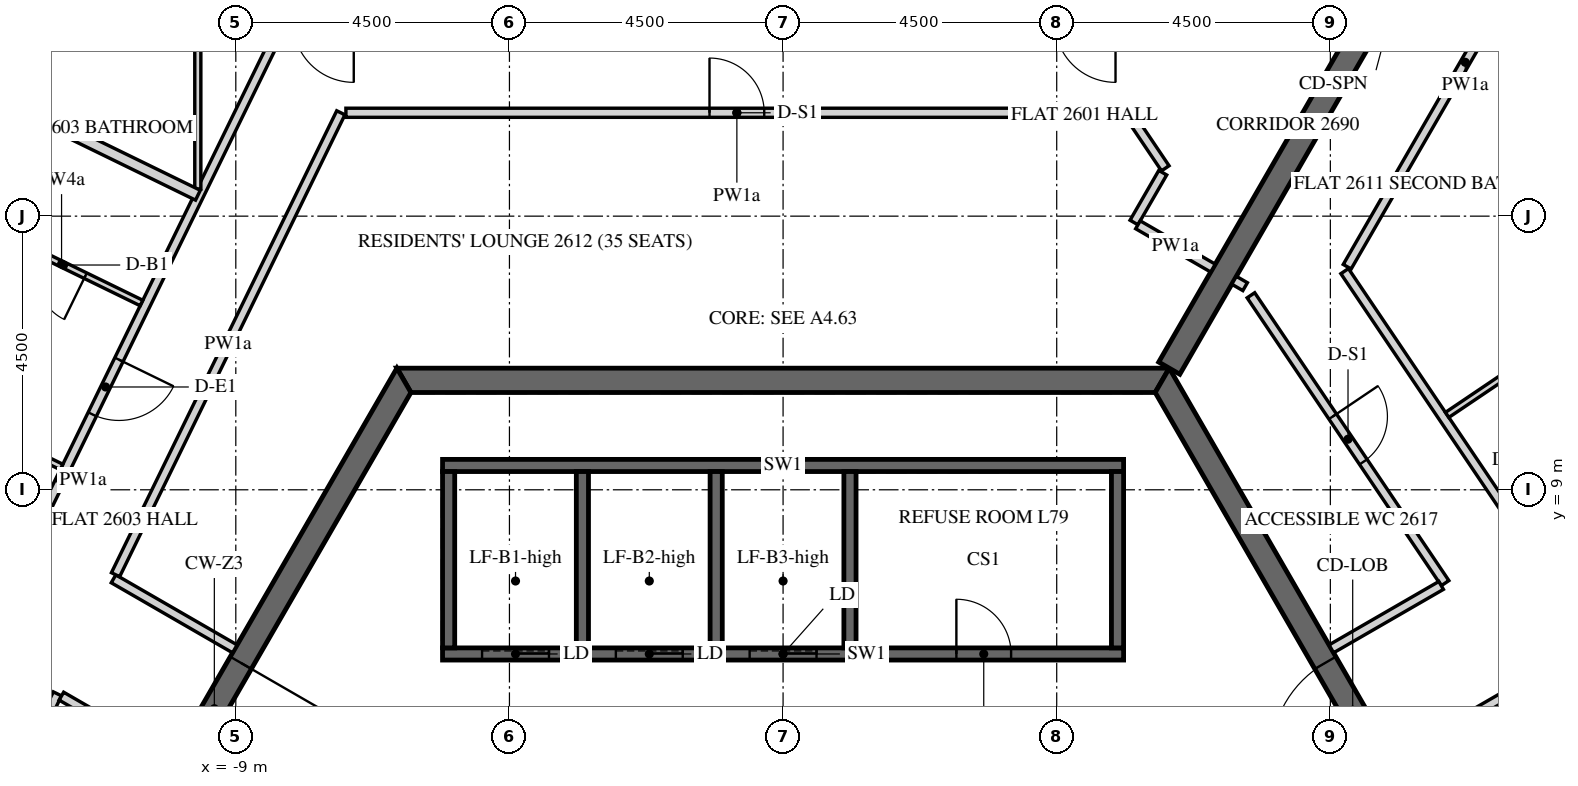
"""IFC4 building model, lengths in metres.
Left out: names, types, materials, properties, quantities, classifications, styles, units other than length and angle.
Written with IfcOpenShell. Run it as: python <this file> out.ifc"""

import sys

from ifc_helpers import new_model, si_unit, direction, frame, frame_2d, origin, place, context, subcontext, project, spatial, polyline, rectangle, outline, extrude, element, fill, save


model = new_model("IFC4")
c1 = context("Model", 3, precision=1e-05, world=origin(), true_north=direction((0.0, 1.0)))
c2 = subcontext(c1, "Body", "Model", "MODEL_VIEW")
j1 = project(units=[si_unit("LENGTHUNIT", "METRE"), si_unit("PLANEANGLEUNIT", "RADIAN")], contexts=[c1])
p1 = place(None, origin())
s1 = spatial("IfcSite", under=j1, at=p1, CompositionType="ELEMENT")
p2 = place(p1, origin())
s2 = spatial("IfcBuilding", under=s1, at=p2, CompositionType="ELEMENT")
p3 = place(p2, frame((0.0, 0.0, 326.4)))
s3 = spatial("IfcBuildingStorey", under=s2, at=p3, CompositionType="ELEMENT", Elevation=326.4)
p4 = place(p3, frame((-6.235, 10.8, -0.15), z_axis=(0.0, 0.0, 1.0), x_axis=(-0.499996419489, -0.866027470984, 0.0)))
e1 = element("IfcWall", 1, at=p4, inside=s3, PredefinedType="SHEAR", context=c2, shape_type="SweptSolid", body=[
    extrude(outline(polyline([(-0.115, -0.2), (12.586, -0.2), (12.355, 0.2), (0.115, 0.2), (-0.115, -0.2)])), origin(), (0.0, 0.0, 1.0), 3.9),
])
p5 = place(p4, frame((5.364, 0.0, 0.15)))
e2 = element("IfcOpeningElement", 2, at=p5, cuts=e1, PredefinedType="OPENING", context=c2, shape_type="SweptSolid", body=[
    extrude(rectangle(XDim=1.8, YDim=2.4, at=frame_2d((0.9, 1.2))), frame((0.0, 0.21, 0.0), z_axis=(0.0, -1.0, 0.0), x_axis=(1.0, 0.0, 0.0)), (0.0, 0.0, 1.0), 0.42),
])
p6 = place(p3, frame((12.471, 0.0, -0.15), z_axis=(0.0, 0.0, 1.0), x_axis=(-0.499996419489, 0.866027470984, 0.0)))
e3 = element("IfcWall", 3, at=p6, inside=s3, PredefinedType="SHEAR", context=c2, shape_type="SweptSolid", body=[
    extrude(outline(polyline([(-0.115, -0.2), (12.586, -0.2), (12.355, 0.2), (0.115, 0.2), (-0.115, -0.2)])), origin(), (0.0, 0.0, 1.0), 3.9),
])
p7 = place(p6, frame((5.306, 0.0, 0.15)))
e4 = element("IfcOpeningElement", 4, at=p7, cuts=e3, PredefinedType="OPENING", context=c2, shape_type="SweptSolid", body=[
    extrude(rectangle(XDim=1.8, YDim=2.4, at=frame_2d((0.9, 1.2))), frame((0.0, 0.21, 0.0), z_axis=(0.0, -1.0, 0.0), x_axis=(1.0, 0.0, 0.0)), (0.0, 0.0, 1.0), 0.42),
])
p8 = place(p3, frame((6.235, 10.8, -0.15), z_axis=(0.0, 0.0, 1.0), x_axis=(-1.0, 0.0, 0.0)))
e5 = element("IfcWall", 5, at=p8, inside=s3, PredefinedType="SHEAR", context=c2, shape_type="SweptSolid", body=[
    extrude(outline(polyline([(-0.115, -0.2), (12.586, -0.2), (12.355, 0.2), (0.115, 0.2), (-0.115, -0.2)])), origin(), (0.0, 0.0, 1.0), 3.9),
])
p9 = place(p3, frame((6.351, 11.0, -0.15), z_axis=(0.0, 0.0, 1.0), x_axis=(0.499998894578, 0.866026041999, 0.0)))
e6 = element("IfcWall", 6, at=p9, inside=s3, PredefinedType="SHEAR", context=c2, shape_type="SweptSolid", body=[
    extrude(rectangle(XDim=15.544, YDim=0.4, at=frame_2d((7.772, 0.0))), origin(), (0.0, 0.0, 1.0), 3.9),
])
p10 = place(p9, frame((6.872, 0.0, 0.15)))
e7 = element("IfcOpeningElement", 7, at=p10, cuts=e6, PredefinedType="OPENING", context=c2, shape_type="SweptSolid", body=[
    extrude(rectangle(XDim=1.8, YDim=2.4, at=frame_2d((0.9, 1.2))), frame((0.0, 0.21, 0.0), z_axis=(0.0, -1.0, 0.0), x_axis=(1.0, 0.0, 0.0)), (0.0, 0.0, 1.0), 0.42),
])
p11 = place(p3, frame((-5.6, 6.3, -0.25), z_axis=(0.0, 0.0, 1.0), x_axis=(1.0, 0.0, 0.0)))
e8 = element("IfcWall", 8, at=p11, inside=s3, PredefinedType="SHEAR", context=c2, shape_type="SweptSolid", body=[
    extrude(rectangle(XDim=11.2, YDim=0.2, at=frame_2d((5.6, 0.0))), origin(), (0.0, 0.0, 1.0), 3.9),
])
p12 = place(p11, frame((8.45, 0.0, 0.25)))
e9 = element("IfcOpeningElement", 9, at=p12, cuts=e8, PredefinedType="OPENING", context=c2, shape_type="SweptSolid", body=[
    extrude(rectangle(XDim=0.9, YDim=2.1, at=frame_2d((0.45, 1.05))), frame((0.0, 0.11, 0.0), z_axis=(0.0, -1.0, 0.0), x_axis=(1.0, 0.0, 0.0)), (0.0, 0.0, 1.0), 0.22),
])
p13 = place(p11, frame((0.65, 0.0, 0.25)))
e10 = element("IfcOpeningElement", 10, at=p13, cuts=e8, PredefinedType="OPENING", context=c2, shape_type="SweptSolid", body=[
    extrude(rectangle(XDim=1.1, YDim=2.1, at=frame_2d((0.55, 1.05))), frame((0.0, 0.11, 0.0), z_axis=(0.0, -1.0, 0.0), x_axis=(1.0, 0.0, 0.0)), (0.0, 0.0, 1.0), 0.22),
])
p14 = place(p11, frame((2.85, 0.0, 0.25)))
e11 = element("IfcOpeningElement", 11, at=p14, cuts=e8, PredefinedType="OPENING", context=c2, shape_type="SweptSolid", body=[
    extrude(rectangle(XDim=1.1, YDim=2.1, at=frame_2d((0.55, 1.05))), frame((0.0, 0.11, 0.0), z_axis=(0.0, -1.0, 0.0), x_axis=(1.0, 0.0, 0.0)), (0.0, 0.0, 1.0), 0.22),
])
p15 = place(p11, frame((5.05, 0.0, 0.25)))
e12 = element("IfcOpeningElement", 12, at=p15, cuts=e8, PredefinedType="OPENING", context=c2, shape_type="SweptSolid", body=[
    extrude(rectangle(XDim=1.1, YDim=2.1, at=frame_2d((0.55, 1.05))), frame((0.0, 0.11, 0.0), z_axis=(0.0, -1.0, 0.0), x_axis=(1.0, 0.0, 0.0)), (0.0, 0.0, 1.0), 0.22),
])
p16 = place(p3, frame((-5.6, 9.4, -0.25), z_axis=(0.0, 0.0, 1.0), x_axis=(1.0, 0.0, 0.0)))
e13 = element("IfcWall", 13, at=p16, inside=s3, PredefinedType="SHEAR", context=c2, shape_type="SweptSolid", body=[
    extrude(rectangle(XDim=11.2, YDim=0.2, at=frame_2d((5.6, 0.0))), origin(), (0.0, 0.0, 1.0), 3.9),
])
for number, where, z_axis, x_axis in (
    (14, (-5.5, 6.4, -0.25), (0.0, 0.0, 1.0), (0.0, 1.0, 0.0)),
    (15, (-3.3, 6.4, -0.25), (0.0, 0.0, 1.0), (0.0, 1.0, 0.0)),
    (16, (-1.1, 6.4, -0.25), (0.0, 0.0, 1.0), (0.0, 1.0, 0.0)),
    (17, (1.1, 6.4, -0.25), (0.0, 0.0, 1.0), (0.0, 1.0, 0.0)),
    (18, (5.5, 6.4, -0.25), (0.0, 0.0, 1.0), (0.0, 1.0, 0.0)),
):
    element("IfcWall", number, at=place(p3, frame(where, z_axis=z_axis, x_axis=x_axis)), inside=s3, PredefinedType="SHEAR", context=c2, shape_type="SweptSolid", body=[
        extrude(rectangle(XDim=2.9, YDim=0.2, at=frame_2d((1.45, 0.0))), origin(), (0.0, 0.0, 1.0), 3.9),
    ])
p17 = place(p3, frame((-8.247, 16.625, 0.0), z_axis=(0.0, 0.0, 1.0), x_axis=(-0.438376416131, -0.89879147625, 0.0)))
e19 = element("IfcWall", 19, at=p17, inside=s3, PredefinedType="PARTITIONING", context=c2, shape_type="SweptSolid", body=[
    extrude(rectangle(XDim=16.606, YDim=0.15, at=frame_2d((8.303, 0.0))), origin(), (0.0, 0.0, 1.0), 2.838),
])
p18 = place(p17, frame((6.103, 0.0, 0.0)))
e20 = element("IfcOpeningElement", 20, at=p18, cuts=e19, PredefinedType="OPENING", context=c2, shape_type="SweptSolid", body=[
    extrude(rectangle(XDim=1.0, YDim=2.1, at=frame_2d((0.5, 1.05))), frame((0.0, 0.085, 0.0), z_axis=(0.0, -1.0, 0.0), x_axis=(1.0, 0.0, 0.0)), (0.0, 0.0, 1.0), 0.17),
])
p19 = place(p3, frame((-9.016, 6.384, 0.0), z_axis=(0.0, 0.0, 1.0), x_axis=(-0.866030286288, 0.49999154316, 0.0)))
e21 = element("IfcWall", 21, at=p19, inside=s3, PredefinedType="PARTITIONING", context=c2, shape_type="SweptSolid", body=[
    extrude(rectangle(XDim=2.304, YDim=0.15, at=frame_2d((1.152, 0.0))), origin(), (0.0, 0.0, 1.0), 2.838),
])
p20 = place(p3, frame((-10.978, 7.604, 0.0), z_axis=(0.0, 0.0, 1.0), x_axis=(0.43838720727, 0.898786212902, 0.0)))
e22 = element("IfcWall", 22, at=p20, inside=s3, PredefinedType="PARTITIONING", context=c2, shape_type="SweptSolid", body=[
    extrude(rectangle(XDim=8.452, YDim=0.15, at=frame_2d((4.226, 0.0))), origin(), (0.0, 0.0, 1.0), 2.838),
])
p21 = place(p3, frame((-7.189, 15.2, 0.0), z_axis=(0.0, 0.0, 1.0), x_axis=(1.0, 0.0, 0.0)))
e23 = element("IfcWall", 23, at=p21, inside=s3, PredefinedType="PARTITIONING", context=c2, shape_type="SweptSolid", body=[
    extrude(rectangle(XDim=12.859, YDim=0.15, at=frame_2d((6.429, 0.0))), origin(), (0.0, 0.0, 1.0), 2.838),
])
p22 = place(p21, frame((5.979, 0.0, 0.0)))
e24 = element("IfcOpeningElement", 24, at=p22, cuts=e23, PredefinedType="OPENING", context=c2, shape_type="SweptSolid", body=[
    extrude(rectangle(XDim=0.9, YDim=2.1, at=frame_2d((0.45, 1.05))), frame((0.0, 0.085, 0.0), z_axis=(0.0, -1.0, 0.0), x_axis=(1.0, 0.0, 0.0)), (0.0, 0.0, 1.0), 0.17),
])
p23 = place(p3, frame((5.72, 15.125, 0.0), z_axis=(0.0, 0.0, 1.0), x_axis=(0.559095340605, -0.829103371187, 0.0)))
e25 = element("IfcWall", 25, at=p23, inside=s3, PredefinedType="PARTITIONING", context=c2, shape_type="SweptSolid", body=[
    extrude(rectangle(XDim=1.011, YDim=0.15, at=frame_2d((0.505, 0.0))), origin(), (0.0, 0.0, 1.0), 2.838),
])
p24 = place(p3, frame((6.244, 14.215, 0.0), z_axis=(0.0, 0.0, 1.0), x_axis=(-0.499998034377, -0.866026538634, 0.0)))
e26 = element("IfcWall", 26, at=p24, inside=s3, PredefinedType="PARTITIONING", context=c2, shape_type="SweptSolid", body=[
    extrude(rectangle(XDim=0.946, YDim=0.15, at=frame_2d((0.473, 0.0))), origin(), (0.0, 0.0, 1.0), 2.838),
])
p25 = place(p3, frame((5.836, 13.358, 0.0), z_axis=(0.0, 0.0, 1.0), x_axis=(0.865988727248, -0.500063520245, 0.0)))
e27 = element("IfcWall", 27, at=p25, inside=s3, PredefinedType="PARTITIONING", context=c2, shape_type="SweptSolid", body=[
    extrude(rectangle(XDim=1.425, YDim=0.15, at=frame_2d((0.712, 0.0))), origin(), (0.0, 0.0, 1.0), 2.838),
])
p26 = place(p3, frame((-14.411, 0.564, 0.0), z_axis=(0.0, 0.0, 1.0), x_axis=(0.438363210996, 0.898797916801, 0.0)))
e28 = element("IfcWall", 28, at=p26, inside=s3, PredefinedType="PARTITIONING", context=c2, shape_type="SweptSolid", body=[
    extrude(rectangle(XDim=5.652, YDim=0.15, at=frame_2d((2.826, 0.0))), origin(), (0.0, 0.0, 1.0), 2.838),
])
p27 = place(p26, frame((2.376, 0.0, 0.0)))
e29 = element("IfcOpeningElement", 29, at=p27, cuts=e28, PredefinedType="OPENING", context=c2, shape_type="SweptSolid", body=[
    extrude(rectangle(XDim=0.9, YDim=2.1, at=frame_2d((0.45, 1.05))), frame((0.0, 0.085, 0.0), z_axis=(0.0, -1.0, 0.0), x_axis=(1.0, 0.0, 0.0)), (0.0, 0.0, 1.0), 0.17),
])
p28 = place(p3, frame((-11.868, 5.606, 0.0), z_axis=(0.0, 0.0, 1.0), x_axis=(0.866033244403, -0.499986419405, 0.0)))
e30 = element("IfcWall", 30, at=p28, inside=s3, PredefinedType="PARTITIONING", context=c2, shape_type="SweptSolid", body=[
    extrude(rectangle(XDim=2.082, YDim=0.15, at=frame_2d((1.041, 0.0))), origin(), (0.0, 0.0, 1.0), 2.838),
])
p29 = place(p3, frame((18.521, -1.171, 0.0), z_axis=(0.0, 0.0, 1.0), x_axis=(-0.559191021435, 0.829038842001, 0.0)))
e31 = element("IfcWall", 31, at=p29, inside=s3, PredefinedType="PARTITIONING", context=c2, shape_type="SweptSolid", body=[
    extrude(rectangle(XDim=16.605, YDim=0.15, at=frame_2d((8.303, 0.0))), origin(), (0.0, 0.0, 1.0), 2.838),
])
p30 = place(p29, frame((9.703, 0.0, 0.0)))
e32 = element("IfcOpeningElement", 32, at=p30, cuts=e31, PredefinedType="OPENING", context=c2, shape_type="SweptSolid", body=[
    extrude(rectangle(XDim=1.0, YDim=2.1, at=frame_2d((0.5, 1.05))), frame((0.0, 0.085, 0.0), z_axis=(0.0, -1.0, 0.0), x_axis=(1.0, 0.0, 0.0)), (0.0, 0.0, 1.0), 0.17),
])
p31 = place(p3, frame((9.277, 12.668, 0.0), z_axis=(0.0, 0.0, 1.0), x_axis=(0.499991012162, 0.866030592853, 0.0)))
e33 = element("IfcWall", 33, at=p31, inside=s3, PredefinedType="PARTITIONING", context=c2, shape_type="SweptSolid", body=[
    extrude(rectangle(XDim=7.764, YDim=0.15, at=frame_2d((3.882, 0.0))), origin(), (0.0, 0.0, 1.0), 2.838),
])
p32 = place(p3, frame((10.066, 4.566, 0.0), z_axis=(0.0, 0.0, 1.0), x_axis=(0.866034075723, 0.499984979461, 0.0)))
e34 = element("IfcWall", 34, at=p32, inside=s3, PredefinedType="PARTITIONING", context=c2, shape_type="SweptSolid", body=[
    extrude(rectangle(XDim=2.308, YDim=0.15, at=frame_2d((1.154, 0.0))), origin(), (0.0, 0.0, 1.0), 2.838),
])
p33 = place(p3, frame((7.416, 12.446, 0.0), z_axis=(0.0, 0.0, 1.0), x_axis=(0.866378867349, -0.499387282788, 0.0)))
e35 = element("IfcWall", 35, at=p33, inside=s3, PredefinedType="PARTITIONING", context=c2, shape_type="SweptSolid", body=[
    extrude(rectangle(XDim=0.21, YDim=0.15, at=frame_2d((0.105, 0.0))), origin(), (0.0, 0.0, 1.0), 2.838),
])
p34 = place(p3, frame((7.694, 12.199, 0.0), z_axis=(0.0, 0.0, 1.0), x_axis=(0.55920112739, -0.829032025392, 0.0)))
e36 = element("IfcWall", 36, at=p34, inside=s3, PredefinedType="PARTITIONING", context=c2, shape_type="SweptSolid", body=[
    extrude(rectangle(XDim=5.71, YDim=0.15, at=frame_2d((2.855, 0.0))), origin(), (0.0, 0.0, 1.0), 2.838),
])
p35 = place(p34, frame((2.405, 0.0, 0.0)))
e37 = element("IfcOpeningElement", 37, at=p35, cuts=e36, PredefinedType="OPENING", context=c2, shape_type="SweptSolid", body=[
    extrude(rectangle(XDim=0.9, YDim=2.1, at=frame_2d((0.45, 1.05))), frame((0.0, 0.085, 0.0), z_axis=(0.0, -1.0, 0.0), x_axis=(1.0, 0.0, 0.0)), (0.0, 0.0, 1.0), 0.17),
])
p36 = place(p3, frame((10.822, 7.427, 0.0), z_axis=(0.0, 0.0, 1.0), x_axis=(-0.866016009309, -0.500016271356, 0.0)))
e38 = element("IfcWall", 38, at=p36, inside=s3, PredefinedType="PARTITIONING", context=c2, shape_type="SweptSolid", body=[
    extrude(rectangle(XDim=2.086, YDim=0.15, at=frame_2d((1.043, 0.0))), origin(), (0.0, 0.0, 1.0), 2.838),
])
p37 = place(p3, frame((-9.625, 13.945, 0.0), z_axis=(0.0, 0.0, 1.0), x_axis=(0.0, 1.0, 0.0)))
e39 = element("IfcWall", 39, at=p37, inside=s3, PredefinedType="PARTITIONING", context=c2, shape_type="SweptSolid", body=[
    extrude(rectangle(XDim=6.955, YDim=0.1, at=frame_2d((3.477, 0.0))), origin(), (0.0, 0.0, 1.0), 2.838),
])
p38 = place(p37, frame((4.405, 0.0, 0.0)))
e40 = element("IfcOpeningElement", 40, at=p38, cuts=e39, PredefinedType="OPENING", context=c2, shape_type="SweptSolid", body=[
    extrude(rectangle(XDim=0.9, YDim=2.1, at=frame_2d((0.45, 1.05))), frame((0.0, 0.06, 0.0), z_axis=(0.0, -1.0, 0.0), x_axis=(1.0, 0.0, 0.0)), (0.0, 0.0, 1.0), 0.12),
])
p39 = place(p3, frame((-17.516, 17.694, 0.0), z_axis=(0.0, 0.0, 1.0), x_axis=(0.898787414812, -0.438384743092, 0.0)))
e41 = element("IfcWall", 41, at=p39, inside=s3, PredefinedType="PARTITIONING", context=c2, shape_type="SweptSolid", body=[
    extrude(rectangle(XDim=8.782, YDim=0.18, at=frame_2d((4.391, 0.0))), origin(), (0.0, 0.0, 1.0), 2.838),
])
p40 = place(p3, frame((-11.866, 9.375, 0.0), z_axis=(0.0, 0.0, 1.0), x_axis=(-0.89880694479, 0.438344699976, 0.0)))
e42 = element("IfcWall", 42, at=p40, inside=s3, PredefinedType="PARTITIONING", context=c2, shape_type="SweptSolid", body=[
    extrude(rectangle(XDim=2.925, YDim=0.1, at=frame_2d((1.462, 0.0))), origin(), (0.0, 0.0, 1.0), 2.838),
])
p41 = place(p40, frame((0.975, 0.0, 0.0)))
e43 = element("IfcOpeningElement", 43, at=p41, cuts=e42, PredefinedType="OPENING", context=c2, shape_type="SweptSolid", body=[
    extrude(rectangle(XDim=0.9, YDim=2.1, at=frame_2d((0.45, 1.05))), frame((0.0, 0.06, 0.0), z_axis=(0.0, -1.0, 0.0), x_axis=(1.0, 0.0, 0.0)), (0.0, 0.0, 1.0), 0.12),
])
p42 = place(p3, frame((-10.551, 12.072, 0.0), z_axis=(0.0, 0.0, 1.0), x_axis=(-0.898790906006, 0.438377585285, 0.0)))
e44 = element("IfcWall", 44, at=p42, inside=s3, PredefinedType="PARTITIONING", context=c2, shape_type="SweptSolid", body=[
    extrude(rectangle(XDim=2.925, YDim=0.1, at=frame_2d((1.462, 0.0))), origin(), (0.0, 0.0, 1.0), 2.838),
])
p43 = place(p42, frame((1.025, 0.0, 0.0)))
e45 = element("IfcOpeningElement", 45, at=p43, cuts=e44, PredefinedType="OPENING", context=c2, shape_type="SweptSolid", body=[
    extrude(rectangle(XDim=0.8, YDim=2.1, at=frame_2d((0.4, 1.05))), frame((0.0, 0.06, 0.0), z_axis=(0.0, -1.0, 0.0), x_axis=(1.0, 0.0, 0.0)), (0.0, 0.0, 1.0), 0.12),
])
p44 = place(p3, frame((10.921, 10.231, 0.0), z_axis=(0.0, 0.0, 1.0), x_axis=(0.829010378124, 0.559233218759, 0.0)))
e46 = element("IfcWall", 46, at=p44, inside=s3, PredefinedType="PARTITIONING", context=c2, shape_type="SweptSolid", body=[
    extrude(rectangle(XDim=3.325, YDim=0.1, at=frame_2d((1.663, 0.0))), origin(), (0.0, 0.0, 1.0), 2.838),
])
p45 = place(p5, origin())
e47 = element("IfcDoor", 47, at=p45, inside=s3, OperationType="DOUBLE_DOOR_SINGLE_SWING", PredefinedType="DOOR", context=c2, shape_type="SweptSolid", body=[
    extrude(rectangle(XDim=1.8, YDim=2.4, at=frame_2d((0.9, 1.2))), frame((0.0, 0.025, 0.0), z_axis=(0.0, -1.0, 0.0), x_axis=(1.0, 0.0, 0.0)), (0.0, 0.0, 1.0), 0.05),
])
fill(e2, e47)
p46 = place(p7, origin())
e48 = element("IfcDoor", 48, at=p46, inside=s3, OperationType="DOUBLE_DOOR_SINGLE_SWING", PredefinedType="DOOR", context=c2, shape_type="SweptSolid", body=[
    extrude(rectangle(XDim=1.8, YDim=2.4, at=frame_2d((0.9, 1.2))), frame((0.0, 0.025, 0.0), z_axis=(0.0, -1.0, 0.0), x_axis=(1.0, 0.0, 0.0)), (0.0, 0.0, 1.0), 0.05),
])
fill(e4, e48)
p47 = place(p12, origin())
e49 = element("IfcDoor", 49, at=p47, inside=s3, OperationType="SINGLE_SWING_LEFT", PredefinedType="DOOR", context=c2, shape_type="SweptSolid", body=[
    extrude(rectangle(XDim=0.9, YDim=2.1, at=frame_2d((0.45, 1.05))), frame((0.0, 0.025, 0.0), z_axis=(0.0, -1.0, 0.0), x_axis=(1.0, 0.0, 0.0)), (0.0, 0.0, 1.0), 0.05),
])
fill(e9, e49)
p48 = place(p13, origin())
e50 = element("IfcDoor", 50, at=p48, inside=s3, OperationType="SLIDING_TO_LEFT", PredefinedType="DOOR", context=c2, shape_type="SweptSolid", body=[
    extrude(rectangle(XDim=1.1, YDim=2.1, at=frame_2d((0.55, 1.05))), frame((0.0, 0.025, 0.0), z_axis=(0.0, -1.0, 0.0), x_axis=(1.0, 0.0, 0.0)), (0.0, 0.0, 1.0), 0.05),
])
fill(e10, e50)
p49 = place(p14, origin())
e51 = element("IfcDoor", 51, at=p49, inside=s3, OperationType="SLIDING_TO_LEFT", PredefinedType="DOOR", context=c2, shape_type="SweptSolid", body=[
    extrude(rectangle(XDim=1.1, YDim=2.1, at=frame_2d((0.55, 1.05))), frame((0.0, 0.025, 0.0), z_axis=(0.0, -1.0, 0.0), x_axis=(1.0, 0.0, 0.0)), (0.0, 0.0, 1.0), 0.05),
])
fill(e11, e51)
p50 = place(p15, origin())
e52 = element("IfcDoor", 52, at=p50, inside=s3, OperationType="SLIDING_TO_LEFT", PredefinedType="DOOR", context=c2, shape_type="SweptSolid", body=[
    extrude(rectangle(XDim=1.1, YDim=2.1, at=frame_2d((0.55, 1.05))), frame((0.0, 0.025, 0.0), z_axis=(0.0, -1.0, 0.0), x_axis=(1.0, 0.0, 0.0)), (0.0, 0.0, 1.0), 0.05),
])
fill(e12, e52)
p51 = place(p18, origin())
e53 = element("IfcDoor", 53, at=p51, inside=s3, OperationType="SINGLE_SWING_LEFT", PredefinedType="DOOR", context=c2, shape_type="SweptSolid", body=[
    extrude(rectangle(XDim=1.0, YDim=2.1, at=frame_2d((0.5, 1.05))), frame((0.0, 0.025, 0.0), z_axis=(0.0, -1.0, 0.0), x_axis=(1.0, 0.0, 0.0)), (0.0, 0.0, 1.0), 0.05),
])
fill(e20, e53)
p52 = place(p43, origin())
e54 = element("IfcDoor", 54, at=p52, inside=s3, OperationType="SINGLE_SWING_RIGHT", PredefinedType="DOOR", context=c2, shape_type="SweptSolid", body=[
    extrude(rectangle(XDim=0.8, YDim=2.1, at=frame_2d((0.4, 1.05))), frame((0.0, 0.025, 0.0), z_axis=(0.0, -1.0, 0.0), x_axis=(1.0, 0.0, 0.0)), (0.0, 0.0, 1.0), 0.05),
])
fill(e45, e54)
p53 = place(p22, origin())
e55 = element("IfcDoor", 55, at=p53, inside=s3, OperationType="SINGLE_SWING_LEFT", PredefinedType="DOOR", context=c2, shape_type="SweptSolid", body=[
    extrude(rectangle(XDim=0.9, YDim=2.1, at=frame_2d((0.45, 1.05))), frame((0.0, 0.025, 0.0), z_axis=(0.0, -1.0, 0.0), x_axis=(1.0, 0.0, 0.0)), (0.0, 0.0, 1.0), 0.05),
])
fill(e24, e55)
p54 = place(p35, origin())
e56 = element("IfcDoor", 56, at=p54, inside=s3, OperationType="SINGLE_SWING_RIGHT", PredefinedType="DOOR", context=c2, shape_type="SweptSolid", body=[
    extrude(rectangle(XDim=0.9, YDim=2.1, at=frame_2d((0.45, 1.05))), frame((0.0, 0.025, 0.0), z_axis=(0.0, -1.0, 0.0), x_axis=(1.0, 0.0, 0.0)), (0.0, 0.0, 1.0), 0.05),
])
fill(e37, e56)
save(model, sys.argv[1])
